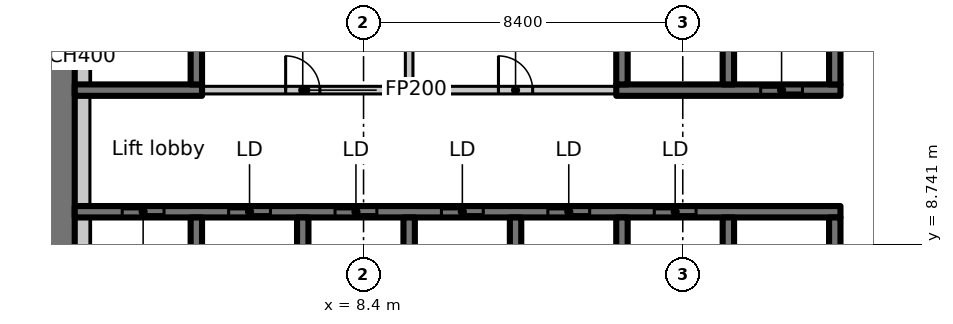
"""IFC4 building model, lengths in metres.
Left out: names, types, materials, properties, quantities, classifications, styles, units other than length and angle.
Written with IfcOpenShell. Run it as: python <this file> out.ifc"""

import sys

from ifc_helpers import new_model, si_unit, direction, frame, frame_2d, origin, place, context, subcontext, project, spatial, rectangle, extrude, element, fill, save


model = new_model("IFC4")
c1 = context("Model", 3, precision=1e-05, world=origin(), true_north=direction((0.0, 1.0)))
c2 = subcontext(c1, "Body", "Model", "MODEL_VIEW")
j1 = project(units=[si_unit("LENGTHUNIT", "METRE"), si_unit("PLANEANGLEUNIT", "RADIAN")], contexts=[c1])
p1 = place(None, origin())
s1 = spatial("IfcSite", under=j1, at=p1, CompositionType="ELEMENT")
p2 = place(p1, origin())
s2 = spatial("IfcBuilding", under=s1, at=p2, CompositionType="ELEMENT")
p3 = place(p2, frame((0.0, 0.0, 116.9)))
s3 = spatial("IfcBuildingStorey", under=s2, at=p3, CompositionType="ELEMENT", Elevation=116.9)
p4 = place(p3, frame((0.4, 7.136, 0.0), z_axis=(0.0, 0.0, 1.0), x_axis=(0.0, 1.0, 0.0)))
e1 = element("IfcWall", 1, at=p4, inside=s3, PredefinedType="SHEAR", context=c2, shape_type="SweptSolid", body=[
    extrude(rectangle(XDim=8.864, YDim=0.8, at=frame_2d((4.432, 0.0))), origin(), (0.0, 0.0, 1.0), 3.35),
])
p5 = place(p3, frame((0.8, 9.6, 0.0), z_axis=(0.0, 0.0, 1.0), x_axis=(1.0, 0.0, 0.0)))
e2 = element("IfcWall", 2, at=p5, inside=s3, PredefinedType="SHEAR", context=c2, shape_type="SweptSolid", body=[
    extrude(rectangle(XDim=20.15, YDim=0.3, at=frame_2d((10.075, 0.0))), origin(), (0.0, 0.0, 1.0), 3.35),
])
p6 = place(p5, frame((1.25, 0.0, 0.0)))
e3 = element("IfcOpeningElement", 3, at=p6, cuts=e2, PredefinedType="OPENING", context=c2, shape_type="SweptSolid", body=[
    extrude(rectangle(XDim=1.1, YDim=2.3, at=frame_2d((0.55, 1.15))), frame((0.0, 0.16, 0.0), z_axis=(0.0, -1.0, 0.0), x_axis=(1.0, 0.0, 0.0)), (0.0, 0.0, 1.0), 0.32),
])
p7 = place(p5, frame((4.05, 0.0, 0.0)))
e4 = element("IfcOpeningElement", 4, at=p7, cuts=e2, PredefinedType="OPENING", context=c2, shape_type="SweptSolid", body=[
    extrude(rectangle(XDim=1.1, YDim=2.3, at=frame_2d((0.55, 1.15))), frame((0.0, 0.16, 0.0), z_axis=(0.0, -1.0, 0.0), x_axis=(1.0, 0.0, 0.0)), (0.0, 0.0, 1.0), 0.32),
])
p8 = place(p5, frame((6.85, 0.0, 0.0)))
e5 = element("IfcOpeningElement", 5, at=p8, cuts=e2, PredefinedType="OPENING", context=c2, shape_type="SweptSolid", body=[
    extrude(rectangle(XDim=1.1, YDim=2.3, at=frame_2d((0.55, 1.15))), frame((0.0, 0.16, 0.0), z_axis=(0.0, -1.0, 0.0), x_axis=(1.0, 0.0, 0.0)), (0.0, 0.0, 1.0), 0.32),
])
p9 = place(p5, frame((9.65, 0.0, 0.0)))
e6 = element("IfcOpeningElement", 6, at=p9, cuts=e2, PredefinedType="OPENING", context=c2, shape_type="SweptSolid", body=[
    extrude(rectangle(XDim=1.1, YDim=2.3, at=frame_2d((0.55, 1.15))), frame((0.0, 0.16, 0.0), z_axis=(0.0, -1.0, 0.0), x_axis=(1.0, 0.0, 0.0)), (0.0, 0.0, 1.0), 0.32),
])
p10 = place(p5, frame((12.45, 0.0, 0.0)))
e7 = element("IfcOpeningElement", 7, at=p10, cuts=e2, PredefinedType="OPENING", context=c2, shape_type="SweptSolid", body=[
    extrude(rectangle(XDim=1.1, YDim=2.3, at=frame_2d((0.55, 1.15))), frame((0.0, 0.16, 0.0), z_axis=(0.0, -1.0, 0.0), x_axis=(1.0, 0.0, 0.0)), (0.0, 0.0, 1.0), 0.32),
])
p11 = place(p5, frame((15.25, 0.0, 0.0)))
e8 = element("IfcOpeningElement", 8, at=p11, cuts=e2, PredefinedType="OPENING", context=c2, shape_type="SweptSolid", body=[
    extrude(rectangle(XDim=1.1, YDim=2.3, at=frame_2d((0.55, 1.15))), frame((0.0, 0.16, 0.0), z_axis=(0.0, -1.0, 0.0), x_axis=(1.0, 0.0, 0.0)), (0.0, 0.0, 1.0), 0.32),
])
for number, where, z_axis, x_axis in (
    (9, (4.0, 7.15, 0.0), (0.0, 0.0, 1.0), (0.0, 1.0, 0.0)),
    (10, (6.8, 7.15, 0.0), (0.0, 0.0, 1.0), (0.0, 1.0, 0.0)),
    (11, (9.6, 7.15, 0.0), (0.0, 0.0, 1.0), (0.0, 1.0, 0.0)),
    (12, (12.4, 7.15, 0.0), (0.0, 0.0, 1.0), (0.0, 1.0, 0.0)),
    (13, (15.2, 7.15, 0.0), (0.0, 0.0, 1.0), (0.0, 1.0, 0.0)),
    (14, (18.0, 7.15, 0.0), (0.0, 0.0, 1.0), (0.0, 1.0, 0.0)),
    (15, (20.8, 7.15, 0.0), (0.0, 0.0, 1.0), (0.0, 1.0, 0.0)),
):
    element("IfcWall", number, at=place(p3, frame(where, z_axis=z_axis, x_axis=x_axis)), inside=s3, PredefinedType="SHEAR", context=c2, shape_type="SweptSolid", body=[
        extrude(rectangle(XDim=2.3, YDim=0.3, at=frame_2d((1.15, 0.0))), origin(), (0.0, 0.0, 1.0), 3.35),
    ])
p12 = place(p3, frame((0.8, 12.8, 0.0), z_axis=(0.0, 0.0, 1.0), x_axis=(1.0, 0.0, 0.0)))
e16 = element("IfcWall", 16, at=p12, inside=s3, PredefinedType="SHEAR", context=c2, shape_type="SweptSolid", body=[
    extrude(rectangle(XDim=3.35, YDim=0.3, at=frame_2d((1.675, 0.0))), origin(), (0.0, 0.0, 1.0), 3.35),
])
p13 = place(p3, frame((4.0, 12.95, 0.0), z_axis=(0.0, 0.0, 1.0), x_axis=(0.0, 1.0, 0.0)))
e17 = element("IfcWall", 17, at=p13, inside=s3, PredefinedType="SHEAR", context=c2, shape_type="SweptSolid", body=[
    extrude(rectangle(XDim=3.05, YDim=0.3, at=frame_2d((1.525, 0.0))), origin(), (0.0, 0.0, 1.0), 3.35),
])
p14 = place(p3, frame((15.05, 12.8, 0.0), z_axis=(0.0, 0.0, 1.0), x_axis=(1.0, 0.0, 0.0)))
e18 = element("IfcWall", 18, at=p14, inside=s3, PredefinedType="SHEAR", context=c2, shape_type="SweptSolid", body=[
    extrude(rectangle(XDim=5.9, YDim=0.3, at=frame_2d((2.95, 0.0))), origin(), (0.0, 0.0, 1.0), 3.35),
])
p15 = place(p14, frame((3.8, 0.0, 0.0)))
e19 = element("IfcOpeningElement", 19, at=p15, cuts=e18, PredefinedType="OPENING", context=c2, shape_type="SweptSolid", body=[
    extrude(rectangle(XDim=1.1, YDim=2.3, at=frame_2d((0.55, 1.15))), frame((0.0, 0.16, 0.0), z_axis=(0.0, -1.0, 0.0), x_axis=(1.0, 0.0, 0.0)), (0.0, 0.0, 1.0), 0.32),
])
for number, where, z_axis, x_axis in (
    (20, (15.2, 12.95, 0.0), (0.0, 0.0, 1.0), (0.0, 1.0, 0.0)),
    (21, (18.0, 12.95, 0.0), (0.0, 0.0, 1.0), (0.0, 1.0, 0.0)),
    (22, (20.8, 12.95, 0.0), (0.0, 0.0, 1.0), (0.0, 1.0, 0.0)),
):
    element("IfcWall", number, at=place(p3, frame(where, z_axis=z_axis, x_axis=x_axis)), inside=s3, PredefinedType="SHEAR", context=c2, shape_type="SweptSolid", body=[
        extrude(rectangle(XDim=3.05, YDim=0.3, at=frame_2d((1.525, 0.0))), origin(), (0.0, 0.0, 1.0), 3.35),
    ])
p16 = place(p3, frame((4.162, 12.8, 0.0), z_axis=(0.0, 0.0, 1.0), x_axis=(1.0, 0.0, 0.0)))
e23 = element("IfcWall", 23, at=p16, inside=s3, PredefinedType="PARTITIONING", context=c2, shape_type="SweptSolid", body=[
    extrude(rectangle(XDim=5.438, YDim=0.2, at=frame_2d((2.719, 0.0))), origin(), (0.0, 0.0, 1.0), 3.35),
])
p17 = place(p16, frame((2.188, 0.0, 0.0)))
e24 = element("IfcOpeningElement", 24, at=p17, cuts=e23, PredefinedType="OPENING", context=c2, shape_type="SweptSolid", body=[
    extrude(rectangle(XDim=0.9, YDim=2.1, at=frame_2d((0.45, 1.05))), frame((0.0, 0.11, 0.0), z_axis=(0.0, -1.0, 0.0), x_axis=(1.0, 0.0, 0.0)), (0.0, 0.0, 1.0), 0.22),
])
p18 = place(p3, frame((9.6, 12.8, 0.0), z_axis=(0.0, 0.0, 1.0), x_axis=(1.0, 0.0, 0.0)))
e25 = element("IfcWall", 25, at=p18, inside=s3, PredefinedType="PARTITIONING", context=c2, shape_type="SweptSolid", body=[
    extrude(rectangle(XDim=5.438, YDim=0.2, at=frame_2d((2.719, 0.0))), origin(), (0.0, 0.0, 1.0), 3.35),
])
p19 = place(p18, frame((2.35, 0.0, 0.0)))
e26 = element("IfcOpeningElement", 26, at=p19, cuts=e25, PredefinedType="OPENING", context=c2, shape_type="SweptSolid", body=[
    extrude(rectangle(XDim=0.9, YDim=2.1, at=frame_2d((0.45, 1.05))), frame((0.0, 0.11, 0.0), z_axis=(0.0, -1.0, 0.0), x_axis=(1.0, 0.0, 0.0)), (0.0, 0.0, 1.0), 0.22),
])
p20 = place(p3, frame((9.6, 15.588, 0.0), z_axis=(0.0, 0.0, 1.0), x_axis=(0.0, -1.0, 0.0)))
e27 = element("IfcWall", 27, at=p20, inside=s3, PredefinedType="PARTITIONING", context=c2, shape_type="SweptSolid", body=[
    extrude(rectangle(XDim=2.688, YDim=0.2, at=frame_2d((1.344, 0.0))), origin(), (0.0, 0.0, 1.0), 3.35),
])
p21 = place(p3, frame((1.0, 7.15, 0.0), z_axis=(0.0, 0.0, 1.0), x_axis=(0.0, 1.0, 0.0)))
e28 = element("IfcWall", 28, at=p21, inside=s3, PredefinedType="PARTITIONING", context=c2, shape_type="SweptSolid", body=[
    extrude(rectangle(XDim=2.3, YDim=0.4, at=frame_2d((1.15, 0.0))), origin(), (0.0, 0.0, 1.0), 3.35),
])
p22 = place(p3, frame((1.0, 9.75, 0.0), z_axis=(0.0, 0.0, 1.0), x_axis=(0.0, 1.0, 0.0)))
e29 = element("IfcWall", 29, at=p22, inside=s3, PredefinedType="PARTITIONING", context=c2, shape_type="SweptSolid", body=[
    extrude(rectangle(XDim=2.9, YDim=0.4, at=frame_2d((1.45, 0.0))), origin(), (0.0, 0.0, 1.0), 3.35),
])
p23 = place(p3, frame((1.0, 12.95, 0.0), z_axis=(0.0, 0.0, 1.0), x_axis=(0.0, 1.0, 0.0)))
e30 = element("IfcWall", 30, at=p23, inside=s3, PredefinedType="PARTITIONING", context=c2, shape_type="SweptSolid", body=[
    extrude(rectangle(XDim=2.65, YDim=0.4, at=frame_2d((1.325, 0.0))), origin(), (0.0, 0.0, 1.0), 3.35),
])
p24 = place(p6, origin())
e31 = element("IfcDoor", 31, at=p24, inside=s3, OperationType="SLIDING_TO_LEFT", PredefinedType="DOOR", context=c2, shape_type="SweptSolid", body=[
    extrude(rectangle(XDim=1.1, YDim=2.3, at=frame_2d((0.55, 1.15))), frame((0.0, 0.025, 0.0), z_axis=(0.0, -1.0, 0.0), x_axis=(1.0, 0.0, 0.0)), (0.0, 0.0, 1.0), 0.05),
])
fill(e3, e31)
p25 = place(p7, origin())
e32 = element("IfcDoor", 32, at=p25, inside=s3, OperationType="SLIDING_TO_LEFT", PredefinedType="DOOR", context=c2, shape_type="SweptSolid", body=[
    extrude(rectangle(XDim=1.1, YDim=2.3, at=frame_2d((0.55, 1.15))), frame((0.0, 0.025, 0.0), z_axis=(0.0, -1.0, 0.0), x_axis=(1.0, 0.0, 0.0)), (0.0, 0.0, 1.0), 0.05),
])
fill(e4, e32)
p26 = place(p8, origin())
e33 = element("IfcDoor", 33, at=p26, inside=s3, OperationType="SLIDING_TO_LEFT", PredefinedType="DOOR", context=c2, shape_type="SweptSolid", body=[
    extrude(rectangle(XDim=1.1, YDim=2.3, at=frame_2d((0.55, 1.15))), frame((0.0, 0.025, 0.0), z_axis=(0.0, -1.0, 0.0), x_axis=(1.0, 0.0, 0.0)), (0.0, 0.0, 1.0), 0.05),
])
fill(e5, e33)
p27 = place(p9, origin())
e34 = element("IfcDoor", 34, at=p27, inside=s3, OperationType="SLIDING_TO_LEFT", PredefinedType="DOOR", context=c2, shape_type="SweptSolid", body=[
    extrude(rectangle(XDim=1.1, YDim=2.3, at=frame_2d((0.55, 1.15))), frame((0.0, 0.025, 0.0), z_axis=(0.0, -1.0, 0.0), x_axis=(1.0, 0.0, 0.0)), (0.0, 0.0, 1.0), 0.05),
])
fill(e6, e34)
p28 = place(p10, origin())
e35 = element("IfcDoor", 35, at=p28, inside=s3, OperationType="SLIDING_TO_LEFT", PredefinedType="DOOR", context=c2, shape_type="SweptSolid", body=[
    extrude(rectangle(XDim=1.1, YDim=2.3, at=frame_2d((0.55, 1.15))), frame((0.0, 0.025, 0.0), z_axis=(0.0, -1.0, 0.0), x_axis=(1.0, 0.0, 0.0)), (0.0, 0.0, 1.0), 0.05),
])
fill(e7, e35)
p29 = place(p11, origin())
e36 = element("IfcDoor", 36, at=p29, inside=s3, OperationType="SLIDING_TO_LEFT", PredefinedType="DOOR", context=c2, shape_type="SweptSolid", body=[
    extrude(rectangle(XDim=1.1, YDim=2.3, at=frame_2d((0.55, 1.15))), frame((0.0, 0.025, 0.0), z_axis=(0.0, -1.0, 0.0), x_axis=(1.0, 0.0, 0.0)), (0.0, 0.0, 1.0), 0.05),
])
fill(e8, e36)
p30 = place(p15, origin())
e37 = element("IfcDoor", 37, at=p30, inside=s3, OperationType="SLIDING_TO_LEFT", PredefinedType="DOOR", context=c2, shape_type="SweptSolid", body=[
    extrude(rectangle(XDim=1.1, YDim=2.3, at=frame_2d((0.55, 1.15))), frame((0.0, 0.025, 0.0), z_axis=(0.0, -1.0, 0.0), x_axis=(1.0, 0.0, 0.0)), (0.0, 0.0, 1.0), 0.05),
])
fill(e19, e37)
p31 = place(p17, origin())
e38 = element("IfcDoor", 38, at=p31, inside=s3, OperationType="SINGLE_SWING_LEFT", PredefinedType="DOOR", context=c2, shape_type="SweptSolid", body=[
    extrude(rectangle(XDim=0.9, YDim=2.1, at=frame_2d((0.45, 1.05))), frame((0.0, 0.025, 0.0), z_axis=(0.0, -1.0, 0.0), x_axis=(1.0, 0.0, 0.0)), (0.0, 0.0, 1.0), 0.05),
])
fill(e24, e38)
p32 = place(p19, origin())
e39 = element("IfcDoor", 39, at=p32, inside=s3, OperationType="SINGLE_SWING_RIGHT", PredefinedType="DOOR", context=c2, shape_type="SweptSolid", body=[
    extrude(rectangle(XDim=0.9, YDim=2.1, at=frame_2d((0.45, 1.05))), frame((0.0, 0.025, 0.0), z_axis=(0.0, -1.0, 0.0), x_axis=(1.0, 0.0, 0.0)), (0.0, 0.0, 1.0), 0.05),
])
fill(e26, e39)
save(model, sys.argv[1])
